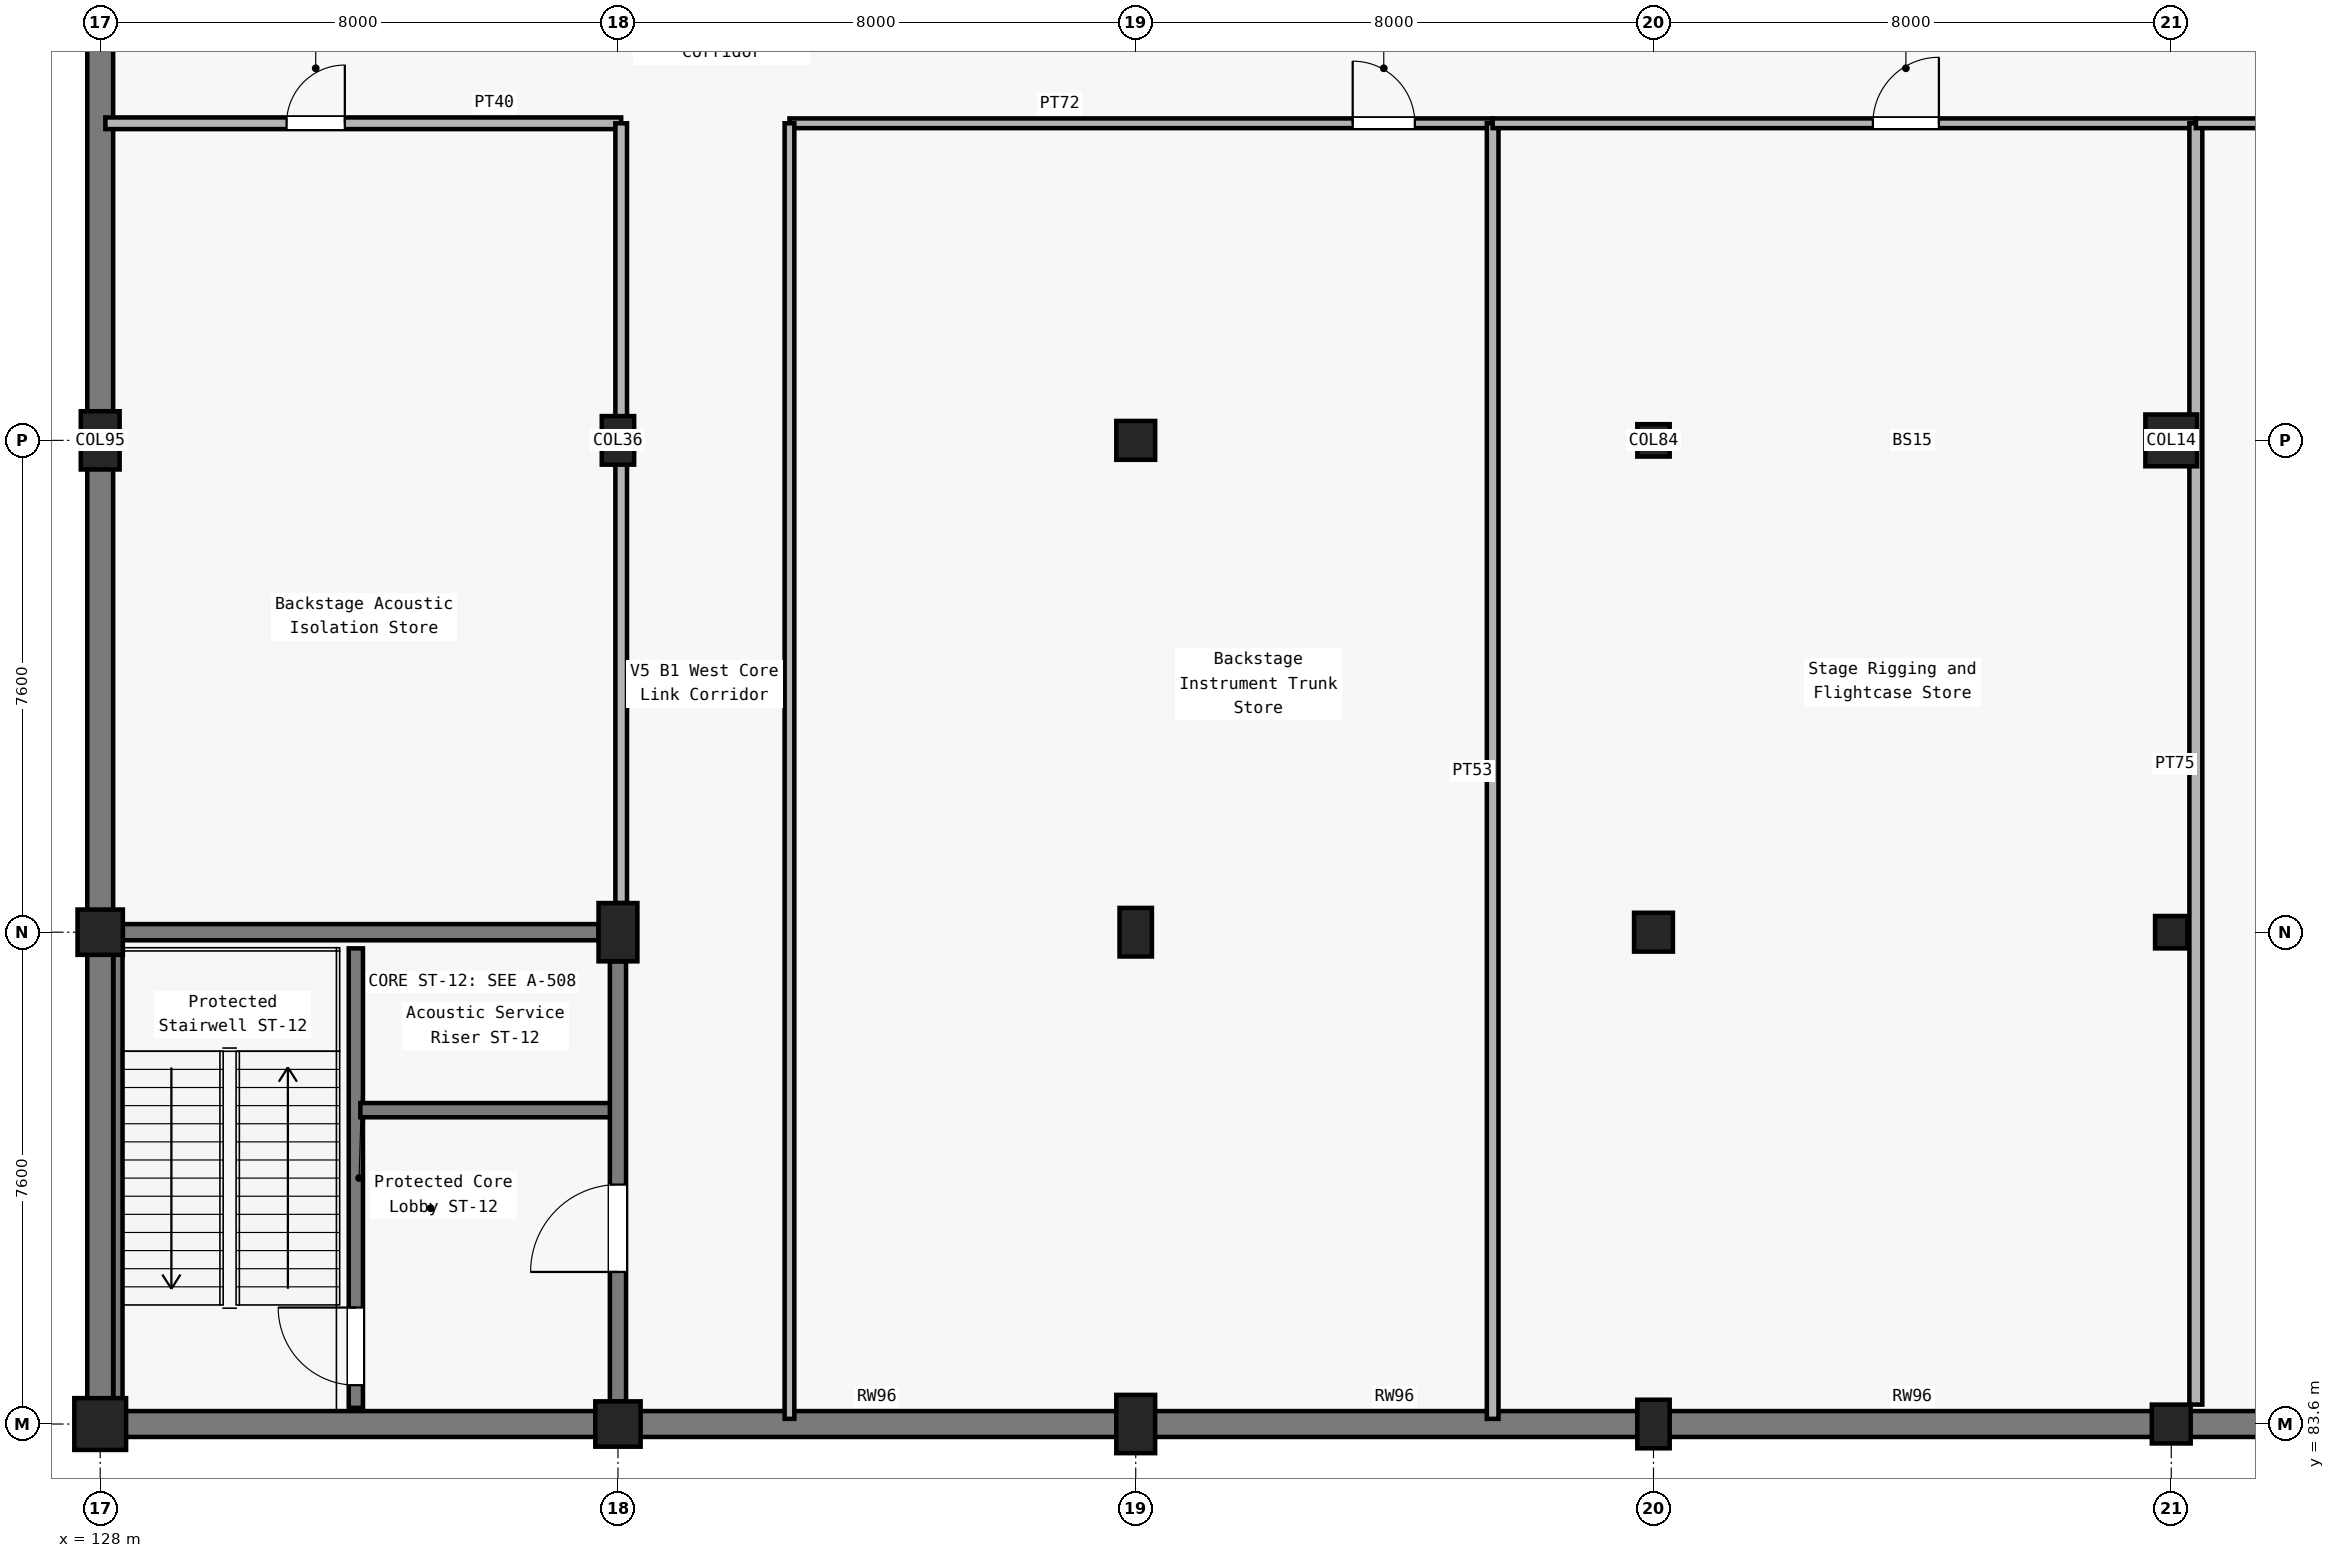
"""IFC4 building model, lengths in metres.
Left out: names, types, materials, properties, quantities, classifications, styles, units other than length and angle.
Written with IfcOpenShell. Run it as: python <this file> out.ifc"""

import sys

from ifc_helpers import new_model, si_unit, direction, frame, frame_2d, origin, origin_2d, place, context, subcontext, project, spatial, rectangle, circle, extrude, element, fill, save


model = new_model("IFC4")
c1 = context("Model", 3, precision=1e-05, world=origin(), true_north=direction((0.0, 1.0)))
c2 = subcontext(c1, "Body", "Model", "MODEL_VIEW")
j1 = project(units=[si_unit("LENGTHUNIT", "METRE"), si_unit("PLANEANGLEUNIT", "RADIAN")], contexts=[c1])
p1 = place(None, origin())
s1 = spatial("IfcSite", under=j1, at=p1, CompositionType="ELEMENT")
p2 = place(p1, origin())
s2 = spatial("IfcBuilding", under=s1, at=p2, CompositionType="ELEMENT")
p3 = place(p2, frame((0.0, 0.0, -5.4)))
s3 = spatial("IfcBuildingStorey", under=s2, at=p3, CompositionType="ELEMENT", Elevation=-5.4)
for number, where, z_axis, x_axis in (
    (1, (128.0, 83.6, 0.0), (0.0, 0.0, 1.0), (1.0, 0.0, 0.0)),
    (2, (136.0, 83.6, 0.0), (0.0, 0.0, 1.0), (1.0, 0.0, 0.0)),
    (3, (144.0, 83.6, 0.0), (0.0, 0.0, 1.0), (1.0, 0.0, 0.0)),
    (4, (152.0, 83.6, 0.0), (0.0, 0.0, 1.0), (1.0, 0.0, 0.0)),
    (5, (160.0, 83.6, 0.0), (0.0, 0.0, 1.0), (1.0, 0.0, 0.0)),
):
    element("IfcWall", number, at=place(p3, frame(where, z_axis=z_axis, x_axis=x_axis)), inside=s3, PredefinedType="USERDEFINED", context=c2, shape_type="SweptSolid", body=[
        extrude(rectangle(XDim=8.0, YDim=0.4, at=frame_2d((4.0, 0.0))), origin(), (0.0, 0.0, 1.0), 5.08),
    ])
p4 = place(p3, frame((128.0, 91.2, 0.0), z_axis=(0.0, 0.0, 1.0), x_axis=(0.0, -1.0, 0.0)))
e6 = element("IfcWall", 6, at=p4, inside=s3, PredefinedType="USERDEFINED", context=c2, shape_type="SweptSolid", body=[
    extrude(rectangle(XDim=7.6, YDim=0.4, at=frame_2d((3.8, 0.0))), origin(), (0.0, 0.0, 1.0), 5.08),
])
p5 = place(p3, frame((128.0, 98.8, 0.0), z_axis=(0.0, 0.0, 1.0), x_axis=(0.0, -1.0, 0.0)))
e7 = element("IfcWall", 7, at=p5, inside=s3, PredefinedType="USERDEFINED", context=c2, shape_type="SweptSolid", body=[
    extrude(rectangle(XDim=7.6, YDim=0.4, at=frame_2d((3.8, 0.0))), origin(), (0.0, 0.0, 1.0), 5.08),
])
p6 = place(p3, frame((128.0, 106.4, 0.0), z_axis=(0.0, 0.0, 1.0), x_axis=(0.0, -1.0, 0.0)))
e8 = element("IfcWall", 8, at=p6, inside=s3, PredefinedType="USERDEFINED", context=c2, shape_type="SweptSolid", body=[
    extrude(rectangle(XDim=7.6, YDim=0.4, at=frame_2d((3.8, 0.0))), origin(), (0.0, 0.0, 1.0), 5.08),
])
p7 = place(p3, frame((128.0, 83.6, 0.0), z_axis=(0.0, 0.0, 1.0), x_axis=(1.0, 0.0, 0.0)))
e9 = element("IfcColumn", 9, at=p7, inside=s3, PredefinedType="COLUMN", context=c2, shape_type="SweptSolid", body=[
    extrude(rectangle(XDim=0.8, YDim=0.8, at=origin_2d()), origin(), (0.0, 0.0, 1.0), 5.4),
])
p8 = place(p3, frame((128.0, 91.2, 0.0), z_axis=(0.0, 0.0, 1.0), x_axis=(1.0, 0.0, 0.0)))
e10 = element("IfcColumn", 10, at=p8, inside=s3, PredefinedType="COLUMN", context=c2, shape_type="SweptSolid", body=[
    extrude(rectangle(XDim=0.7, YDim=0.7, at=origin_2d()), origin(), (0.0, 0.0, 1.0), 5.4),
])
p9 = place(p3, frame((128.0, 98.8, 0.0), z_axis=(0.0, 0.0, 1.0), x_axis=(1.0, 0.0, 0.0)))
e11 = element("IfcColumn", 11, at=p9, inside=s3, PredefinedType="COLUMN", context=c2, shape_type="SweptSolid", body=[
    extrude(rectangle(XDim=0.6, YDim=0.9, at=origin_2d()), origin(), (0.0, 0.0, 1.0), 5.4),
])
p10 = place(p3, frame((136.0, 83.6, 0.0), z_axis=(0.0, 0.0, 1.0), x_axis=(1.0, 0.0, 0.0)))
e12 = element("IfcColumn", 12, at=p10, inside=s3, PredefinedType="COLUMN", context=c2, shape_type="SweptSolid", body=[
    extrude(rectangle(XDim=0.7, YDim=0.7, at=origin_2d()), origin(), (0.0, 0.0, 1.0), 5.4),
])
p11 = place(p3, frame((136.0, 91.2, 0.0), z_axis=(0.0, 0.0, 1.0), x_axis=(1.0, 0.0, 0.0)))
e13 = element("IfcColumn", 13, at=p11, inside=s3, PredefinedType="COLUMN", context=c2, shape_type="SweptSolid", body=[
    extrude(rectangle(XDim=0.6, YDim=0.9, at=origin_2d()), origin(), (0.0, 0.0, 1.0), 5.4),
])
p12 = place(p3, frame((136.0, 98.8, 0.0), z_axis=(0.0, 0.0, 1.0), x_axis=(1.0, 0.0, 0.0)))
e14 = element("IfcColumn", 14, at=p12, inside=s3, PredefinedType="COLUMN", context=c2, shape_type="SweptSolid", body=[
    extrude(rectangle(XDim=0.5, YDim=0.75, at=origin_2d()), origin(), (0.0, 0.0, 1.0), 5.4),
])
p13 = place(p3, frame((144.0, 83.6, 0.0), z_axis=(0.0, 0.0, 1.0), x_axis=(1.0, 0.0, 0.0)))
e15 = element("IfcColumn", 15, at=p13, inside=s3, PredefinedType="COLUMN", context=c2, shape_type="SweptSolid", body=[
    extrude(rectangle(XDim=0.6, YDim=0.9, at=origin_2d()), origin(), (0.0, 0.0, 1.0), 5.4),
])
p14 = place(p3, frame((144.0, 91.2, 0.0), z_axis=(0.0, 0.0, 1.0), x_axis=(1.0, 0.0, 0.0)))
e16 = element("IfcColumn", 16, at=p14, inside=s3, PredefinedType="COLUMN", context=c2, shape_type="SweptSolid", body=[
    extrude(rectangle(XDim=0.5, YDim=0.75, at=origin_2d()), origin(), (0.0, 0.0, 1.0), 5.4),
])
p15 = place(p3, frame((144.0, 98.8, 0.0), z_axis=(0.0, 0.0, 1.0), x_axis=(1.0, 0.0, 0.0)))
e17 = element("IfcColumn", 17, at=p15, inside=s3, PredefinedType="COLUMN", context=c2, shape_type="SweptSolid", body=[
    extrude(rectangle(XDim=0.6, YDim=0.6, at=origin_2d()), origin(), (0.0, 0.0, 1.0), 5.4),
])
p16 = place(p3, frame((152.0, 83.6, 0.0), z_axis=(0.0, 0.0, 1.0), x_axis=(1.0, 0.0, 0.0)))
e18 = element("IfcColumn", 18, at=p16, inside=s3, PredefinedType="COLUMN", context=c2, shape_type="SweptSolid", body=[
    extrude(rectangle(XDim=0.5, YDim=0.75, at=origin_2d()), origin(), (0.0, 0.0, 1.0), 5.4),
])
p17 = place(p3, frame((152.0, 91.2, 0.0), z_axis=(0.0, 0.0, 1.0), x_axis=(1.0, 0.0, 0.0)))
e19 = element("IfcColumn", 19, at=p17, inside=s3, PredefinedType="COLUMN", context=c2, shape_type="SweptSolid", body=[
    extrude(rectangle(XDim=0.6, YDim=0.6, at=origin_2d()), origin(), (0.0, 0.0, 1.0), 5.4),
])
p18 = place(p3, frame((152.0, 98.8, 0.0), z_axis=(0.0, 0.0, 1.0), x_axis=(1.0, 0.0, 0.0)))
e20 = element("IfcColumn", 20, at=p18, inside=s3, PredefinedType="COLUMN", context=c2, shape_type="SweptSolid", body=[
    extrude(rectangle(XDim=0.5, YDim=0.5, at=origin_2d()), origin(), (0.0, 0.0, 1.0), 5.4),
])
p19 = place(p3, frame((160.0, 83.6, 0.0), z_axis=(0.0, 0.0, 1.0), x_axis=(1.0, 0.0, 0.0)))
e21 = element("IfcColumn", 21, at=p19, inside=s3, PredefinedType="COLUMN", context=c2, shape_type="SweptSolid", body=[
    extrude(rectangle(XDim=0.6, YDim=0.6, at=origin_2d()), origin(), (0.0, 0.0, 1.0), 5.4),
])
p20 = place(p3, frame((160.0, 91.2, 0.0), z_axis=(0.0, 0.0, 1.0), x_axis=(1.0, 0.0, 0.0)))
e22 = element("IfcColumn", 22, at=p20, inside=s3, PredefinedType="COLUMN", context=c2, shape_type="SweptSolid", body=[
    extrude(rectangle(XDim=0.5, YDim=0.5, at=origin_2d()), origin(), (0.0, 0.0, 1.0), 5.4),
])
p21 = place(p3, frame((160.0, 98.8, 0.0), z_axis=(0.0, 0.0, 1.0), x_axis=(1.0, 0.0, 0.0)))
e23 = element("IfcColumn", 23, at=p21, inside=s3, PredefinedType="COLUMN", context=c2, shape_type="SweptSolid", body=[
    extrude(circle(Radius=0.4, at=origin_2d()), origin(), (0.0, 0.0, 1.0), 5.4),
])
p22 = place(p3, frame((128.35, 91.2, 0.0), z_axis=(0.0, 0.0, 1.0), x_axis=(1.0, 0.0, 0.0)))
e24 = element("IfcWall", 24, at=p22, inside=s3, PredefinedType="SOLIDWALL", context=c2, shape_type="SweptSolid", body=[
    extrude(rectangle(XDim=7.35, YDim=0.25, at=frame_2d((3.675, 0.0))), origin(), (0.0, 0.0, 1.0), 4.33),
])
p23 = place(p3, frame((131.95, 83.85, 0.0), z_axis=(0.0, 0.0, 1.0), x_axis=(0.0, 1.0, 0.0)))
e25 = element("IfcWall", 25, at=p23, inside=s3, PredefinedType="SOLIDWALL", context=c2, shape_type="SweptSolid", body=[
    extrude(rectangle(XDim=7.1, YDim=0.22, at=frame_2d((3.55, 0.0))), origin(), (0.0, 0.0, 1.0), 5.08),
])
p24 = place(p23, frame((0.35, 0.0, 0.0)))
e26 = element("IfcOpeningElement", 26, at=p24, cuts=e25, PredefinedType="OPENING", context=c2, shape_type="SweptSolid", body=[
    extrude(rectangle(XDim=1.2, YDim=2.15, at=frame_2d((0.6, 1.075))), frame((0.0, 0.12, 0.0), z_axis=(0.0, -1.0, 0.0), x_axis=(1.0, 0.0, 0.0)), (0.0, 0.0, 1.0), 0.24),
])
p25 = place(p3, frame((132.02, 88.45, 0.0), z_axis=(0.0, 0.0, 1.0), x_axis=(1.0, 0.0, 0.0)))
e27 = element("IfcWall", 27, at=p25, inside=s3, PredefinedType="SOLIDWALL", context=c2, shape_type="SweptSolid", body=[
    extrude(rectangle(XDim=3.93, YDim=0.22, at=frame_2d((1.965, 0.0))), origin(), (0.0, 0.0, 1.0), 4.455),
])
p26 = place(p3, frame((136.0, 83.95, 0.0), z_axis=(0.0, 0.0, 1.0), x_axis=(0.0, 1.0, 0.0)))
e28 = element("IfcWall", 28, at=p26, inside=s3, PredefinedType="SOLIDWALL", context=c2, shape_type="SweptSolid", body=[
    extrude(rectangle(XDim=6.8, YDim=0.25, at=frame_2d((3.4, 0.0))), origin(), (0.0, 0.0, 1.0), 4.45),
])
p27 = place(p26, frame((2.0, 0.0, 0.0)))
e29 = element("IfcOpeningElement", 29, at=p27, cuts=e28, PredefinedType="OPENING", context=c2, shape_type="SweptSolid", body=[
    extrude(rectangle(XDim=1.35, YDim=2.2, at=frame_2d((0.675, 1.1))), frame((0.0, 0.135, 0.0), z_axis=(0.0, -1.0, 0.0), x_axis=(1.0, 0.0, 0.0)), (0.0, 0.0, 1.0), 0.27),
])
p28 = place(p3, frame((128.08, 103.7, 0.0), z_axis=(0.0, 0.0, 1.0), x_axis=(1.0, 0.0, 0.0)))
e30 = element("IfcWall", 30, at=p28, inside=s3, PredefinedType="PARTITIONING", context=c2, shape_type="SweptSolid", body=[
    extrude(rectangle(XDim=7.97, YDim=0.18, at=frame_2d((3.985, 0.0))), origin(), (0.0, 0.0, 1.0), 4.305),
])
p29 = place(p28, frame((2.8, 0.0, 0.0)))
e31 = element("IfcOpeningElement", 31, at=p29, cuts=e30, PredefinedType="OPENING", context=c2, shape_type="SweptSolid", body=[
    extrude(rectangle(XDim=0.9, YDim=2.1, at=frame_2d((0.45, 1.05))), frame((0.0, 0.1, 0.0), z_axis=(0.0, -1.0, 0.0), x_axis=(1.0, 0.0, 0.0)), (0.0, 0.0, 1.0), 0.2),
])
p30 = place(p3, frame((136.05, 91.65, 0.0), z_axis=(0.0, 0.0, 1.0), x_axis=(0.0, 1.0, 0.0)))
e32 = element("IfcWall", 32, at=p30, inside=s3, PredefinedType="PARTITIONING", context=c2, shape_type="SweptSolid", body=[
    extrude(rectangle(XDim=12.05, YDim=0.18, at=frame_2d((6.025, 0.0))), origin(), (0.0, 0.0, 1.0), 4.41),
])
p31 = place(p3, frame((138.65, 103.7, 0.0), z_axis=(0.0, 0.0, 1.0), x_axis=(1.0, 0.0, 0.0)))
e33 = element("IfcWall", 33, at=p31, inside=s3, PredefinedType="PARTITIONING", context=c2, shape_type="SweptSolid", body=[
    extrude(rectangle(XDim=10.865, YDim=0.15, at=frame_2d((5.433, 0.0))), origin(), (0.0, 0.0, 1.0), 4.305),
])
p32 = place(p31, frame((8.702, 0.0, 0.0)))
e34 = element("IfcOpeningElement", 34, at=p32, cuts=e33, PredefinedType="OPENING", context=c2, shape_type="SweptSolid", body=[
    extrude(rectangle(XDim=0.96, YDim=2.1, at=frame_2d((0.48, 1.05))), frame((0.0, 0.085, 0.0), z_axis=(0.0, -1.0, 0.0), x_axis=(1.0, 0.0, 0.0)), (0.0, 0.0, 1.0), 0.17),
])
p33 = place(p3, frame((149.515, 83.68, 0.0), z_axis=(0.0, 0.0, 1.0), x_axis=(0.0, 1.0, 0.0)))
e35 = element("IfcWall", 35, at=p33, inside=s3, PredefinedType="PARTITIONING", context=c2, shape_type="SweptSolid", body=[
    extrude(rectangle(XDim=20.02, YDim=0.18, at=frame_2d((10.01, 0.0))), origin(), (0.0, 0.0, 1.0), 4.12),
])
p34 = place(p3, frame((149.515, 103.7, 0.0), z_axis=(0.0, 0.0, 1.0), x_axis=(1.0, 0.0, 0.0)))
e36 = element("IfcWall", 36, at=p34, inside=s3, PredefinedType="PARTITIONING", context=c2, shape_type="SweptSolid", body=[
    extrude(rectangle(XDim=10.865, YDim=0.15, at=frame_2d((5.433, 0.0))), origin(), (0.0, 0.0, 1.0), 4.255),
])
p35 = place(p34, frame((5.875, 0.0, 0.0)))
e37 = element("IfcOpeningElement", 37, at=p35, cuts=e36, PredefinedType="OPENING", context=c2, shape_type="SweptSolid", body=[
    extrude(rectangle(XDim=1.02, YDim=2.1, at=frame_2d((0.51, 1.05))), frame((0.0, 0.085, 0.0), z_axis=(0.0, -1.0, 0.0), x_axis=(1.0, 0.0, 0.0)), (0.0, 0.0, 1.0), 0.17),
])
p36 = place(p3, frame((160.38, 83.9, 0.0), z_axis=(0.0, 0.0, 1.0), x_axis=(0.0, 1.0, 0.0)))
e38 = element("IfcWall", 38, at=p36, inside=s3, PredefinedType="PARTITIONING", context=c2, shape_type="SweptSolid", body=[
    extrude(rectangle(XDim=19.8, YDim=0.2, at=frame_2d((9.9, 0.0))), origin(), (0.0, 0.0, 1.0), 4.255),
])
p37 = place(p3, frame((160.38, 103.7, 0.0), z_axis=(0.0, 0.0, 1.0), x_axis=(1.0, 0.0, 0.0)))
e39 = element("IfcWall", 39, at=p37, inside=s3, PredefinedType="PARTITIONING", context=c2, shape_type="SweptSolid", body=[
    extrude(rectangle(XDim=12.676, YDim=0.15, at=frame_2d((6.338, 0.0))), origin(), (0.0, 0.0, 1.0), 4.405),
])
p38 = place(p37, frame((11.456, 0.0, 0.0)))
e40 = element("IfcOpeningElement", 40, at=p38, cuts=e39, PredefinedType="OPENING", context=c2, shape_type="SweptSolid", body=[
    extrude(rectangle(XDim=1.08, YDim=2.1, at=frame_2d((0.54, 1.05))), frame((0.0, 0.085, 0.0), z_axis=(0.0, -1.0, 0.0), x_axis=(1.0, 0.0, 0.0)), (0.0, 0.0, 1.0), 0.17),
])
p39 = place(p3, frame((138.65, 83.68, 0.0), z_axis=(0.0, 0.0, 1.0), x_axis=(0.0, 1.0, 0.0)))
e41 = element("IfcWall", 41, at=p39, inside=s3, PredefinedType="PARTITIONING", context=c2, shape_type="SweptSolid", body=[
    extrude(rectangle(XDim=20.02, YDim=0.15, at=frame_2d((10.01, 0.0))), origin(), (0.0, 0.0, 1.0), 4.435),
])
p40 = place(p3, frame((128.275, 83.75, 0.0), z_axis=(0.0, 0.0, 1.0), x_axis=(0.0, 1.0, 0.0)))
e42 = element("IfcWall", 42, at=p40, inside=s3, PredefinedType="SOLIDWALL", context=c2, shape_type="SweptSolid", body=[
    extrude(rectangle(XDim=7.3, YDim=0.14, at=frame_2d((3.65, 0.0))), origin(), (0.0, 0.0, 1.0), 5.08),
])
p41 = place(p24, origin())
e43 = element("IfcDoor", 43, at=p41, inside=s3, OperationType="SINGLE_SWING_RIGHT", PredefinedType="DOOR", context=c2, shape_type="SweptSolid", body=[
    extrude(rectangle(XDim=1.2, YDim=2.15, at=frame_2d((0.6, 1.075))), frame((0.0, 0.025, 0.0), z_axis=(0.0, -1.0, 0.0), x_axis=(1.0, 0.0, 0.0)), (0.0, 0.0, 1.0), 0.05),
])
fill(e26, e43)
p42 = place(p27, origin())
e44 = element("IfcDoor", 44, at=p42, inside=s3, OperationType="SINGLE_SWING_LEFT", PredefinedType="DOOR", context=c2, shape_type="SweptSolid", body=[
    extrude(rectangle(XDim=1.35, YDim=2.2, at=frame_2d((0.675, 1.1))), frame((0.0, 0.025, 0.0), z_axis=(0.0, -1.0, 0.0), x_axis=(1.0, 0.0, 0.0)), (0.0, 0.0, 1.0), 0.05),
])
fill(e29, e44)
p43 = place(p29, origin())
e45 = element("IfcDoor", 45, at=p43, inside=s3, OperationType="SINGLE_SWING_RIGHT", PredefinedType="DOOR", context=c2, shape_type="SweptSolid", body=[
    extrude(rectangle(XDim=0.9, YDim=2.1, at=frame_2d((0.45, 1.05))), frame((0.0, 0.025, 0.0), z_axis=(0.0, -1.0, 0.0), x_axis=(1.0, 0.0, 0.0)), (0.0, 0.0, 1.0), 0.05),
])
fill(e31, e45)
p44 = place(p32, origin())
e46 = element("IfcDoor", 46, at=p44, inside=s3, OperationType="SINGLE_SWING_LEFT", PredefinedType="DOOR", context=c2, shape_type="SweptSolid", body=[
    extrude(rectangle(XDim=0.96, YDim=2.1, at=frame_2d((0.48, 1.05))), frame((0.0, 0.025, 0.0), z_axis=(0.0, -1.0, 0.0), x_axis=(1.0, 0.0, 0.0)), (0.0, 0.0, 1.0), 0.05),
])
fill(e34, e46)
p45 = place(p35, origin())
e47 = element("IfcDoor", 47, at=p45, inside=s3, OperationType="SINGLE_SWING_RIGHT", PredefinedType="DOOR", context=c2, shape_type="SweptSolid", body=[
    extrude(rectangle(XDim=1.02, YDim=2.1, at=frame_2d((0.51, 1.05))), frame((0.0, 0.025, 0.0), z_axis=(0.0, -1.0, 0.0), x_axis=(1.0, 0.0, 0.0)), (0.0, 0.0, 1.0), 0.05),
])
fill(e37, e47)
save(model, sys.argv[1])
